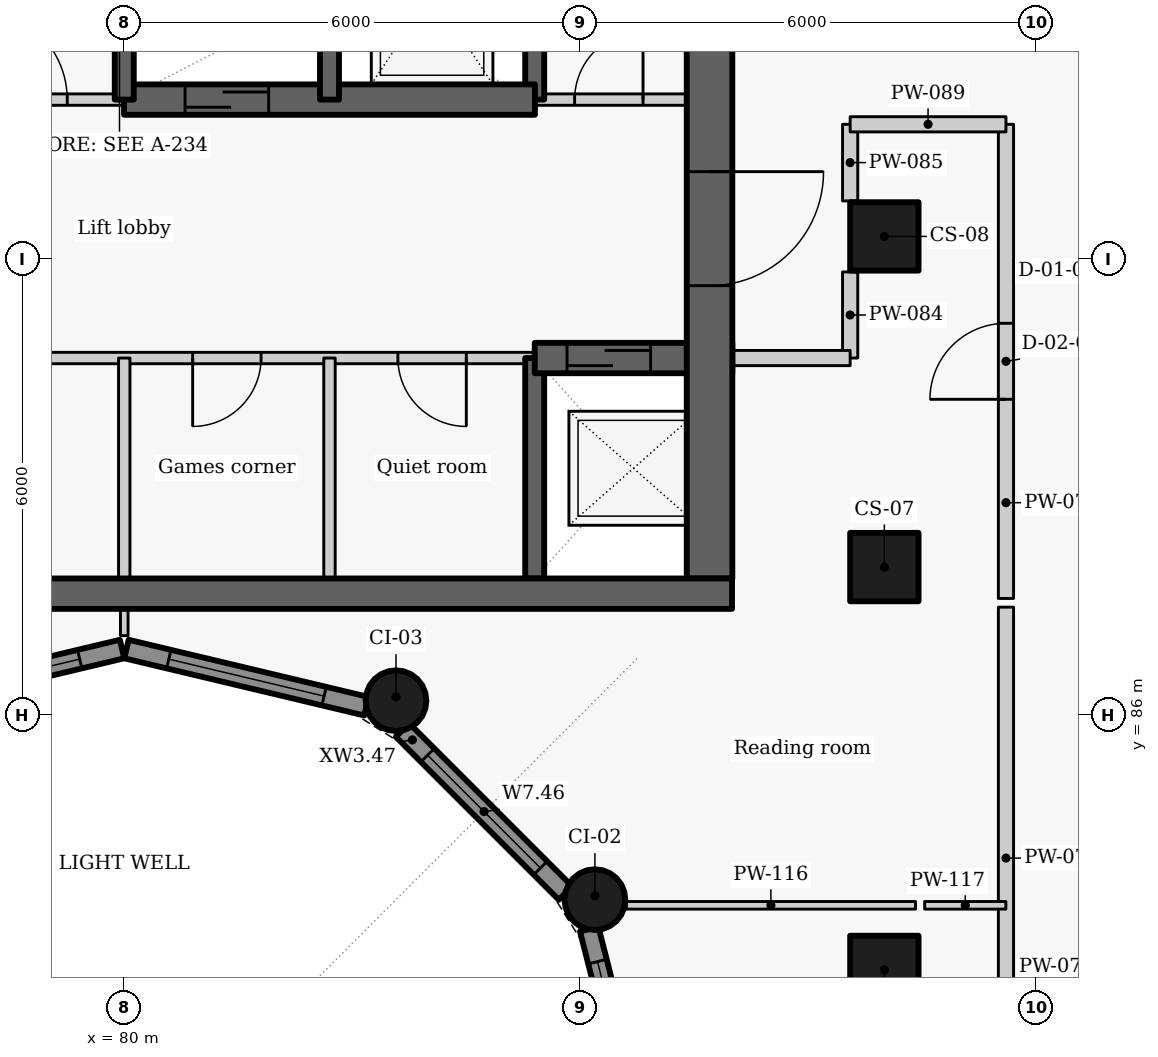
"""IFC4 building model, lengths in metres.
Left out: names, types, materials, properties, quantities, classifications, styles, units other than length and angle.
Written with IfcOpenShell. Run it as: python <this file> out.ifc"""

import sys

from ifc_helpers import new_model, si_unit, direction, frame, frame_2d, origin, origin_2d, place, context, subcontext, project, spatial, rectangle, circle, extrude, element, fill, save


model = new_model("IFC4")
c1 = context("Model", 3, precision=1e-05, world=origin(), true_north=direction((0.0, 1.0)))
c2 = subcontext(c1, "Body", "Model", "MODEL_VIEW")
j1 = project(units=[si_unit("LENGTHUNIT", "METRE"), si_unit("PLANEANGLEUNIT", "RADIAN")], contexts=[c1])
p1 = place(None, origin())
s1 = spatial("IfcSite", under=j1, at=p1, CompositionType="ELEMENT")
p2 = place(p1, origin())
s2 = spatial("IfcBuilding", under=s1, at=p2, CompositionType="ELEMENT")
p3 = place(p2, frame((0.0, 0.0, 193.2)))
s3 = spatial("IfcBuildingStorey", under=s2, at=p3, CompositionType="ELEMENT", Elevation=193.2)
for number, where, z_axis, x_axis in (
    (1, (90.0, 82.65, 0.0), (0.0, 0.0, 1.0), (0.0, 1.0, 0.0)),
    (2, (90.0, 87.95, 0.0), (0.0, 0.0, 1.0), (0.0, 1.0, 0.0)),
    (3, (90.0, 92.3, 0.0), (0.0, 0.0, 1.0), (0.0, 1.0, 0.0)),
):
    element("IfcColumn", number, at=place(p3, frame(where, z_axis=z_axis, x_axis=x_axis)), inside=s3, PredefinedType="COLUMN", context=c2, shape_type="SweptSolid", body=[
        extrude(rectangle(XDim=0.9, YDim=0.9, at=origin_2d()), origin(), (0.0, 0.0, 1.0), 3.3),
    ])
for number, where, z_axis, x_axis in (
    (4, (86.192, 83.575, 0.0), (0.0, 0.0, 1.0), (-0.5, 0.866, 0.0)),
    (5, (83.575, 86.192, 0.0), (0.0, 0.0, 1.0), (-0.866, 0.5, 0.0)),
):
    element("IfcColumn", number, at=place(p3, frame(where, z_axis=z_axis, x_axis=x_axis)), inside=s3, PredefinedType="COLUMN", context=c2, shape_type="SweptSolid", body=[
        extrude(circle(Radius=0.4, at=origin_2d()), origin(), (0.0, 0.0, 1.0), 3.3),
    ])
p4 = place(p3, frame((76.814, 86.119, 0.0), z_axis=(0.0, 0.0, 1.0), x_axis=(0.972773113459, 0.231759508395, 0.0)))
e6 = element("IfcWall", 6, at=p4, inside=s3, PredefinedType="SOLIDWALL", context=c2, shape_type="SweptSolid", body=[
    extrude(rectangle(XDim=3.246, YDim=0.25, at=frame_2d((1.623, 0.0))), origin(), (0.0, 0.0, 1.0), 2.425),
])
p5 = place(p4, frame((0.573, 0.0, 0.9)))
e7 = element("IfcOpeningElement", 7, at=p5, cuts=e6, PredefinedType="OPENING", context=c2, shape_type="SweptSolid", body=[
    extrude(rectangle(XDim=2.1, YDim=1.1, at=frame_2d((1.05, 0.55))), frame((0.0, 0.135, 0.0), z_axis=(0.0, -1.0, 0.0), x_axis=(1.0, 0.0, 0.0)), (0.0, 0.0, 1.0), 0.27),
])
p6 = place(p3, frame((80.029, 86.872, 0.0), z_axis=(0.0, 0.0, 1.0), x_axis=(0.972773113459, -0.231759508395, 0.0)))
e8 = element("IfcWall", 8, at=p6, inside=s3, PredefinedType="SOLIDWALL", context=c2, shape_type="SweptSolid", body=[
    extrude(rectangle(XDim=3.246, YDim=0.25, at=frame_2d((1.623, 0.0))), origin(), (0.0, 0.0, 1.0), 2.425),
])
p7 = place(p6, frame((0.573, 0.0, 0.9)))
e9 = element("IfcOpeningElement", 9, at=p7, cuts=e8, PredefinedType="OPENING", context=c2, shape_type="SweptSolid", body=[
    extrude(rectangle(XDim=2.1, YDim=1.1, at=frame_2d((1.05, 0.55))), frame((0.0, 0.135, 0.0), z_axis=(0.0, -1.0, 0.0), x_axis=(1.0, 0.0, 0.0)), (0.0, 0.0, 1.0), 0.27),
])
p8 = place(p3, frame((83.661, 85.806, 0.0), z_axis=(0.0, 0.0, 1.0), x_axis=(0.707106781187, -0.707106781187, 0.0)))
e10 = element("IfcWall", 10, at=p8, inside=s3, PredefinedType="SOLIDWALL", context=c2, shape_type="SweptSolid", body=[
    extrude(rectangle(XDim=3.033, YDim=0.25, at=frame_2d((1.517, 0.0))), origin(), (0.0, 0.0, 1.0), 2.425),
])
p9 = place(p8, frame((0.467, 0.0, 0.9)))
e11 = element("IfcOpeningElement", 11, at=p9, cuts=e10, PredefinedType="OPENING", context=c2, shape_type="SweptSolid", body=[
    extrude(rectangle(XDim=2.1, YDim=1.1, at=frame_2d((1.05, 0.55))), frame((0.0, 0.135, 0.0), z_axis=(0.0, -1.0, 0.0), x_axis=(1.0, 0.0, 0.0)), (0.0, 0.0, 1.0), 0.27),
])
p10 = place(p3, frame((86.117, 83.187, 0.0), z_axis=(0.0, 0.0, 1.0), x_axis=(0.247055971283, -0.969001211069, 0.0)))
e12 = element("IfcWall", 12, at=p10, inside=s3, PredefinedType="SOLIDWALL", context=c2, shape_type="SweptSolid", body=[
    extrude(rectangle(XDim=3.01, YDim=0.25, at=frame_2d((1.505, 0.0))), origin(), (0.0, 0.0, 1.0), 2.425),
])
p11 = place(p10, frame((0.441, 0.0, 0.9)))
e13 = element("IfcOpeningElement", 13, at=p11, cuts=e12, PredefinedType="OPENING", context=c2, shape_type="SweptSolid", body=[
    extrude(rectangle(XDim=2.1, YDim=1.1, at=frame_2d((1.05, 0.55))), frame((0.0, 0.135, 0.0), z_axis=(0.0, -1.0, 0.0), x_axis=(1.0, 0.0, 0.0)), (0.0, 0.0, 1.0), 0.27),
])
p12 = place(p3, frame((85.4, 90.7, 0.0), z_axis=(0.0, 0.0, 1.0), x_axis=(-1.0, 0.0, 0.0)))
e14 = element("IfcWall", 14, at=p12, inside=s3, PredefinedType="PARTITIONING", context=c2, shape_type="SweptSolid", body=[
    extrude(rectangle(XDim=13.4, YDim=0.15, at=frame_2d((6.7, 0.0))), origin(), (0.0, 0.0, 1.0), 3.025),
])
p13 = place(p12, frame((11.325, 0.0, 0.0)))
e15 = element("IfcOpeningElement", 15, at=p13, cuts=e14, PredefinedType="OPENING", context=c2, shape_type="SweptSolid", body=[
    extrude(rectangle(XDim=0.9, YDim=2.1, at=frame_2d((0.45, 1.05))), frame((0.0, 0.085, 0.0), z_axis=(0.0, -1.0, 0.0), x_axis=(1.0, 0.0, 0.0)), (0.0, 0.0, 1.0), 0.17),
])
p14 = place(p12, frame((7.65, 0.0, 0.0)))
e16 = element("IfcOpeningElement", 16, at=p14, cuts=e14, PredefinedType="OPENING", context=c2, shape_type="SweptSolid", body=[
    extrude(rectangle(XDim=0.9, YDim=2.1, at=frame_2d((0.45, 1.05))), frame((0.0, 0.085, 0.0), z_axis=(0.0, -1.0, 0.0), x_axis=(1.0, 0.0, 0.0)), (0.0, 0.0, 1.0), 0.17),
])
p15 = place(p12, frame((3.6, 0.0, 0.0)))
e17 = element("IfcOpeningElement", 17, at=p15, cuts=e14, PredefinedType="OPENING", context=c2, shape_type="SweptSolid", body=[
    extrude(rectangle(XDim=0.9, YDim=2.1, at=frame_2d((0.45, 1.05))), frame((0.0, 0.085, 0.0), z_axis=(0.0, -1.0, 0.0), x_axis=(1.0, 0.0, 0.0)), (0.0, 0.0, 1.0), 0.17),
])
p16 = place(p12, frame((0.9, 0.0, 0.0)))
e18 = element("IfcOpeningElement", 18, at=p16, cuts=e14, PredefinedType="OPENING", context=c2, shape_type="SweptSolid", body=[
    extrude(rectangle(XDim=0.9, YDim=2.1, at=frame_2d((0.45, 1.05))), frame((0.0, 0.085, 0.0), z_axis=(0.0, -1.0, 0.0), x_axis=(1.0, 0.0, 0.0)), (0.0, 0.0, 1.0), 0.17),
])
p17 = place(p3, frame((85.4, 87.8, -0.275), z_axis=(0.0, 0.0, 1.0), x_axis=(0.0, 1.0, 0.0)))
e19 = element("IfcWall", 19, at=p17, inside=s3, PredefinedType="SHEAR", context=c2, shape_type="SweptSolid", body=[
    extrude(rectangle(XDim=2.9, YDim=0.25, at=frame_2d((1.45, 0.0))), origin(), (0.0, 0.0, 1.0), 3.3),
])
p18 = place(p3, frame((85.4, 94.1, -0.275), z_axis=(0.0, 0.0, 1.0), x_axis=(0.0, 1.0, 0.0)))
e20 = element("IfcWall", 20, at=p18, inside=s3, PredefinedType="SHEAR", context=c2, shape_type="SweptSolid", body=[
    extrude(rectangle(XDim=2.8, YDim=0.25, at=frame_2d((1.4, 0.0))), origin(), (0.0, 0.0, 1.0), 3.3),
])
p19 = place(p3, frame((85.4, 90.7, -0.275), z_axis=(0.0, 0.0, 1.0), x_axis=(1.0, 0.0, 0.0)))
e21 = element("IfcWall", 21, at=p19, inside=s3, PredefinedType="SHEAR", context=c2, shape_type="SweptSolid", body=[
    extrude(rectangle(XDim=2.6, YDim=0.4, at=frame_2d((1.3, 0.0))), origin(), (0.0, 0.0, 1.0), 3.3),
])
p20 = place(p19, frame((0.425, 0.0, 0.275)))
e22 = element("IfcOpeningElement", 22, at=p20, cuts=e21, PredefinedType="OPENING", context=c2, shape_type="SweptSolid", body=[
    extrude(rectangle(XDim=1.1, YDim=2.1, at=frame_2d((0.55, 1.05))), frame((0.0, 0.21, 0.0), z_axis=(0.0, -1.0, 0.0), x_axis=(1.0, 0.0, 0.0)), (0.0, 0.0, 1.0), 0.42),
])
p21 = place(p3, frame((87.7, 102.05, -0.275), z_axis=(0.0, 0.0, 1.0), x_axis=(0.0, -1.0, 0.0)))
e23 = element("IfcWall", 23, at=p21, inside=s3, PredefinedType="SHEAR", context=c2, shape_type="SweptSolid", body=[
    extrude(rectangle(XDim=14.25, YDim=0.6, at=frame_2d((7.125, 0.0))), origin(), (0.0, 0.0, 1.0), 3.3),
])
p22 = place(p21, frame((8.898, 0.0, 0.275)))
e24 = element("IfcOpeningElement", 24, at=p22, cuts=e23, PredefinedType="OPENING", context=c2, shape_type="SweptSolid", body=[
    extrude(rectangle(XDim=1.5, YDim=2.1, at=frame_2d((0.75, 1.05))), frame((0.0, 0.31, 0.0), z_axis=(0.0, -1.0, 0.0), x_axis=(1.0, 0.0, 0.0)), (0.0, 0.0, 1.0), 0.62),
])
for number, where, z_axis, x_axis in (
    (25, (80.0, 87.8, 0.0), (0.0, 0.0, 1.0), (0.0, 1.0, 0.0)),
    (26, (82.7, 87.8, 0.0), (0.0, 0.0, 1.0), (0.0, 1.0, 0.0)),
):
    element("IfcWall", number, at=place(p3, frame(where, z_axis=z_axis, x_axis=x_axis)), inside=s3, PredefinedType="PARTITIONING", context=c2, shape_type="SweptSolid", body=[
        extrude(rectangle(XDim=2.9, YDim=0.15, at=frame_2d((1.45, 0.0))), origin(), (0.0, 0.0, 1.0), 3.025),
    ])
p23 = place(p3, frame((77.297, 94.1, 0.0), z_axis=(0.0, 0.0, 1.0), x_axis=(1.0, 0.0, 0.0)))
e27 = element("IfcWall", 27, at=p23, inside=s3, PredefinedType="PARTITIONING", context=c2, shape_type="SweptSolid", body=[
    extrude(rectangle(XDim=2.706, YDim=0.15, at=frame_2d((1.353, 0.0))), origin(), (0.0, 0.0, 1.0), 3.025),
])
p24 = place(p23, frame((0.753, 0.0, 0.0)))
e28 = element("IfcOpeningElement", 28, at=p24, cuts=e27, PredefinedType="OPENING", context=c2, shape_type="SweptSolid", body=[
    extrude(rectangle(XDim=1.2, YDim=2.1, at=frame_2d((0.6, 1.05))), frame((0.0, 0.085, 0.0), z_axis=(0.0, -1.0, 0.0), x_axis=(1.0, 0.0, 0.0)), (0.0, 0.0, 1.0), 0.17),
])
p25 = place(p3, frame((85.397, 94.1, 0.0), z_axis=(0.0, 0.0, 1.0), x_axis=(1.0, 0.0, 0.0)))
e29 = element("IfcWall", 29, at=p25, inside=s3, PredefinedType="PARTITIONING", context=c2, shape_type="SweptSolid", body=[
    extrude(rectangle(XDim=2.603, YDim=0.15, at=frame_2d((1.302, 0.0))), origin(), (0.0, 0.0, 1.0), 3.025),
])
p26 = place(p25, frame((0.528, 0.0, 0.0)))
e30 = element("IfcOpeningElement", 30, at=p26, cuts=e29, PredefinedType="OPENING", context=c2, shape_type="SweptSolid", body=[
    extrude(rectangle(XDim=0.9, YDim=2.1, at=frame_2d((0.45, 1.05))), frame((0.0, 0.085, 0.0), z_axis=(0.0, -1.0, 0.0), x_axis=(1.0, 0.0, 0.0)), (0.0, 0.0, 1.0), 0.17),
])
p27 = place(p3, frame((79.997, 94.1, -0.275), z_axis=(0.0, 0.0, 1.0), x_axis=(1.0, 0.0, 0.0)))
e31 = element("IfcWall", 31, at=p27, inside=s3, PredefinedType="SHEAR", context=c2, shape_type="SweptSolid", body=[
    extrude(rectangle(XDim=5.406, YDim=0.4, at=frame_2d((2.703, 0.0))), origin(), (0.0, 0.0, 1.0), 3.3),
])
p28 = place(p27, frame((0.803, 0.0, 0.275)))
e32 = element("IfcOpeningElement", 32, at=p28, cuts=e31, PredefinedType="OPENING", context=c2, shape_type="SweptSolid", body=[
    extrude(rectangle(XDim=1.1, YDim=2.1, at=frame_2d((0.55, 1.05))), frame((0.0, 0.21, 0.0), z_axis=(0.0, -1.0, 0.0), x_axis=(1.0, 0.0, 0.0)), (0.0, 0.0, 1.0), 0.42),
])
for number, where, z_axis, x_axis in (
    (33, (80.0, 94.1, -0.275), (0.0, 0.0, 1.0), (0.0, 1.0, 0.0)),
    (34, (82.7, 94.1, -0.275), (0.0, 0.0, 1.0), (0.0, 1.0, 0.0)),
):
    element("IfcWall", number, at=place(p3, frame(where, z_axis=z_axis, x_axis=x_axis)), inside=s3, PredefinedType="SHEAR", context=c2, shape_type="SweptSolid", body=[
        extrude(rectangle(XDim=2.8, YDim=0.25, at=frame_2d((1.4, 0.0))), origin(), (0.0, 0.0, 1.0), 3.3),
    ])
p29 = place(p3, frame((91.6, 76.937, 0.0), z_axis=(0.0, 0.0, 1.0), x_axis=(0.0, 1.0, 0.0)))
e35 = element("IfcWall", 35, at=p29, inside=s3, PredefinedType="PARTITIONING", context=c2, shape_type="SweptSolid", body=[
    extrude(rectangle(XDim=10.486, YDim=0.2, at=frame_2d((5.243, 0.0))), origin(), (0.0, 0.0, 1.0), 3.025),
])
p30 = place(p29, frame((2.783, 0.0, 0.0)))
e36 = element("IfcOpeningElement", 36, at=p30, cuts=e35, PredefinedType="OPENING", context=c2, shape_type="SweptSolid", body=[
    extrude(rectangle(XDim=1.0, YDim=2.1, at=frame_2d((0.5, 1.05))), frame((0.0, 0.11, 0.0), z_axis=(0.0, -1.0, 0.0), x_axis=(1.0, 0.0, 0.0)), (0.0, 0.0, 1.0), 0.22),
])
p31 = place(p3, frame((91.6, 87.537, 0.0), z_axis=(0.0, 0.0, 1.0), x_axis=(0.0, 1.0, 0.0)))
e37 = element("IfcWall", 37, at=p31, inside=s3, PredefinedType="PARTITIONING", context=c2, shape_type="SweptSolid", body=[
    extrude(rectangle(XDim=6.238, YDim=0.2, at=frame_2d((3.119, 0.0))), origin(), (0.0, 0.0, 1.0), 3.025),
])
p32 = place(p31, frame((2.62, 0.0, 0.0)))
e38 = element("IfcOpeningElement", 38, at=p32, cuts=e37, PredefinedType="OPENING", context=c2, shape_type="SweptSolid", body=[
    extrude(rectangle(XDim=1.0, YDim=2.1, at=frame_2d((0.5, 1.05))), frame((0.0, 0.11, 0.0), z_axis=(0.0, -1.0, 0.0), x_axis=(1.0, 0.0, 0.0)), (0.0, 0.0, 1.0), 0.22),
])
p33 = place(p3, frame((89.55, 90.7, 0.0), z_axis=(0.0, 0.0, 1.0), x_axis=(0.0, 1.0, 0.0)))
e39 = element("IfcWall", 39, at=p33, inside=s3, PredefinedType="PARTITIONING", context=c2, shape_type="SweptSolid", body=[
    extrude(rectangle(XDim=1.133, YDim=0.2, at=frame_2d((0.566, 0.0))), origin(), (0.0, 0.0, 1.0), 3.025),
])
p34 = place(p3, frame((89.55, 92.767, 0.0), z_axis=(0.0, 0.0, 1.0), x_axis=(0.0, 1.0, 0.0)))
e40 = element("IfcWall", 40, at=p34, inside=s3, PredefinedType="PARTITIONING", context=c2, shape_type="SweptSolid", body=[
    extrude(rectangle(XDim=1.008, YDim=0.2, at=frame_2d((0.504, 0.0))), origin(), (0.0, 0.0, 1.0), 3.025),
])
p35 = place(p3, frame((89.55, 93.775, 0.0), z_axis=(0.0, 0.0, 1.0), x_axis=(1.0, 0.0, 0.0)))
e41 = element("IfcWall", 41, at=p35, inside=s3, PredefinedType="PARTITIONING", context=c2, shape_type="SweptSolid", body=[
    extrude(rectangle(XDim=2.05, YDim=0.2, at=frame_2d((1.025, 0.0))), origin(), (0.0, 0.0, 1.0), 2.505),
])
p36 = place(p3, frame((88.0, 90.7, 0.0), z_axis=(0.0, 0.0, 1.0), x_axis=(1.0, 0.0, 0.0)))
e42 = element("IfcWall", 42, at=p36, inside=s3, PredefinedType="PARTITIONING", context=c2, shape_type="SweptSolid", body=[
    extrude(rectangle(XDim=1.55, YDim=0.2, at=frame_2d((0.775, 0.0))), origin(), (0.0, 0.0, 1.0), 3.025),
])
p37 = place(p3, frame((80.0, 87.048, 0.0), z_axis=(0.0, 0.0, 1.0), x_axis=(0.0, 1.0, 0.0)))
e43 = element("IfcWall", 43, at=p37, inside=s3, PredefinedType="PARTITIONING", context=c2, shape_type="SweptSolid", body=[
    extrude(rectangle(XDim=0.352, YDim=0.1, at=frame_2d((0.176, 0.0))), origin(), (0.0, 0.0, 1.0), 3.025),
])
p38 = place(p3, frame((86.605, 83.5, 0.0), z_axis=(0.0, 0.0, 1.0), x_axis=(1.0, 0.0, 0.0)))
e44 = element("IfcWall", 44, at=p38, inside=s3, PredefinedType="PARTITIONING", context=c2, shape_type="SweptSolid", body=[
    extrude(rectangle(XDim=3.805, YDim=0.1, at=frame_2d((1.903, 0.0))), origin(), (0.0, 0.0, 1.0), 2.505),
])
p39 = place(p3, frame((90.53, 83.5, 0.0), z_axis=(0.0, 0.0, 1.0), x_axis=(1.0, 0.0, 0.0)))
e45 = element("IfcWall", 45, at=p39, inside=s3, PredefinedType="PARTITIONING", context=c2, shape_type="SweptSolid", body=[
    extrude(rectangle(XDim=1.069, YDim=0.1, at=frame_2d((0.535, 0.0))), origin(), (0.0, 0.0, 1.0), 3.025),
])
p40 = place(p3, frame((72.004, 87.6, -0.275), z_axis=(0.0, 0.0, 1.0), x_axis=(1.0, 0.0, 0.0)))
e46 = element("IfcWall", 46, at=p40, inside=s3, PredefinedType="SHEAR", context=c2, shape_type="SweptSolid", body=[
    extrude(rectangle(XDim=15.992, YDim=0.4, at=frame_2d((7.996, 0.0))), origin(), (0.0, 0.0, 1.0), 3.3),
])
p41 = place(p5, origin())
e47 = element("IfcWindow", 47, at=p41, inside=s3, PartitioningType="SINGLE_PANEL", PredefinedType="WINDOW", context=c2, shape_type="SweptSolid", body=[
    extrude(rectangle(XDim=2.1, YDim=1.1, at=frame_2d((1.05, 0.55))), frame((0.0, 0.03, 0.0), z_axis=(0.0, -1.0, 0.0), x_axis=(1.0, 0.0, 0.0)), (0.0, 0.0, 1.0), 0.06),
])
fill(e7, e47)
p42 = place(p7, origin())
e48 = element("IfcWindow", 48, at=p42, inside=s3, PartitioningType="SINGLE_PANEL", PredefinedType="WINDOW", context=c2, shape_type="SweptSolid", body=[
    extrude(rectangle(XDim=2.1, YDim=1.1, at=frame_2d((1.05, 0.55))), frame((0.0, 0.03, 0.0), z_axis=(0.0, -1.0, 0.0), x_axis=(1.0, 0.0, 0.0)), (0.0, 0.0, 1.0), 0.06),
])
fill(e9, e48)
p43 = place(p9, origin())
e49 = element("IfcWindow", 49, at=p43, inside=s3, PartitioningType="SINGLE_PANEL", PredefinedType="WINDOW", context=c2, shape_type="SweptSolid", body=[
    extrude(rectangle(XDim=2.1, YDim=1.1, at=frame_2d((1.05, 0.55))), frame((0.0, 0.03, 0.0), z_axis=(0.0, -1.0, 0.0), x_axis=(1.0, 0.0, 0.0)), (0.0, 0.0, 1.0), 0.06),
])
fill(e11, e49)
p44 = place(p11, origin())
e50 = element("IfcWindow", 50, at=p44, inside=s3, PartitioningType="SINGLE_PANEL", PredefinedType="WINDOW", context=c2, shape_type="SweptSolid", body=[
    extrude(rectangle(XDim=2.1, YDim=1.1, at=frame_2d((1.05, 0.55))), frame((0.0, 0.03, 0.0), z_axis=(0.0, -1.0, 0.0), x_axis=(1.0, 0.0, 0.0)), (0.0, 0.0, 1.0), 0.06),
])
fill(e13, e50)
p45 = place(p20, origin())
e51 = element("IfcDoor", 51, at=p45, inside=s3, OperationType="SLIDING_TO_LEFT", PredefinedType="DOOR", context=c2, shape_type="SweptSolid", body=[
    extrude(rectangle(XDim=1.1, YDim=2.1, at=frame_2d((0.55, 1.05))), frame((0.0, 0.025, 0.0), z_axis=(0.0, -1.0, 0.0), x_axis=(1.0, 0.0, 0.0)), (0.0, 0.0, 1.0), 0.05),
])
fill(e22, e51)
p46 = place(p15, origin())
e52 = element("IfcDoor", 52, at=p46, inside=s3, OperationType="SINGLE_SWING_RIGHT", PredefinedType="DOOR", context=c2, shape_type="SweptSolid", body=[
    extrude(rectangle(XDim=0.9, YDim=2.1, at=frame_2d((0.45, 1.05))), frame((0.0, 0.025, 0.0), z_axis=(0.0, -1.0, 0.0), x_axis=(1.0, 0.0, 0.0)), (0.0, 0.0, 1.0), 0.05),
])
fill(e17, e52)
p47 = place(p16, origin())
e53 = element("IfcDoor", 53, at=p47, inside=s3, OperationType="SINGLE_SWING_LEFT", PredefinedType="DOOR", context=c2, shape_type="SweptSolid", body=[
    extrude(rectangle(XDim=0.9, YDim=2.1, at=frame_2d((0.45, 1.05))), frame((0.0, 0.025, 0.0), z_axis=(0.0, -1.0, 0.0), x_axis=(1.0, 0.0, 0.0)), (0.0, 0.0, 1.0), 0.05),
])
fill(e18, e53)
p48 = place(p24, origin())
e54 = element("IfcDoor", 54, at=p48, inside=s3, OperationType="DOUBLE_DOOR_SINGLE_SWING", PredefinedType="DOOR", context=c2, shape_type="SweptSolid", body=[
    extrude(rectangle(XDim=1.2, YDim=2.1, at=frame_2d((0.6, 1.05))), frame((0.0, 0.025, 0.0), z_axis=(0.0, -1.0, 0.0), x_axis=(1.0, 0.0, 0.0)), (0.0, 0.0, 1.0), 0.05),
])
fill(e28, e54)
p49 = place(p28, origin())
e55 = element("IfcDoor", 55, at=p49, inside=s3, OperationType="SLIDING_TO_LEFT", PredefinedType="DOOR", context=c2, shape_type="SweptSolid", body=[
    extrude(rectangle(XDim=1.1, YDim=2.1, at=frame_2d((0.55, 1.05))), frame((0.0, 0.025, 0.0), z_axis=(0.0, -1.0, 0.0), x_axis=(1.0, 0.0, 0.0)), (0.0, 0.0, 1.0), 0.05),
])
fill(e32, e55)
p50 = place(p26, origin())
e56 = element("IfcDoor", 56, at=p50, inside=s3, OperationType="SINGLE_SWING_RIGHT", PredefinedType="DOOR", context=c2, shape_type="SweptSolid", body=[
    extrude(rectangle(XDim=0.9, YDim=2.1, at=frame_2d((0.45, 1.05))), frame((0.0, 0.025, 0.0), z_axis=(0.0, -1.0, 0.0), x_axis=(1.0, 0.0, 0.0)), (0.0, 0.0, 1.0), 0.05),
])
fill(e30, e56)
p51 = place(p32, origin())
e57 = element("IfcDoor", 57, at=p51, inside=s3, OperationType="SINGLE_SWING_LEFT", PredefinedType="DOOR", context=c2, shape_type="SweptSolid", body=[
    extrude(rectangle(XDim=1.0, YDim=2.1, at=frame_2d((0.5, 1.05))), frame((0.0, 0.025, 0.0), z_axis=(0.0, -1.0, 0.0), x_axis=(1.0, 0.0, 0.0)), (0.0, 0.0, 1.0), 0.05),
])
fill(e38, e57)
p52 = place(p22, origin())
e58 = element("IfcDoor", 58, at=p52, inside=s3, OperationType="DOUBLE_DOOR_SINGLE_SWING", PredefinedType="DOOR", context=c2, shape_type="SweptSolid", body=[
    extrude(rectangle(XDim=1.5, YDim=2.1, at=frame_2d((0.75, 1.05))), frame((0.0, 0.025, 0.0), z_axis=(0.0, -1.0, 0.0), x_axis=(1.0, 0.0, 0.0)), (0.0, 0.0, 1.0), 0.05),
])
fill(e24, e58)
save(model, sys.argv[1])
